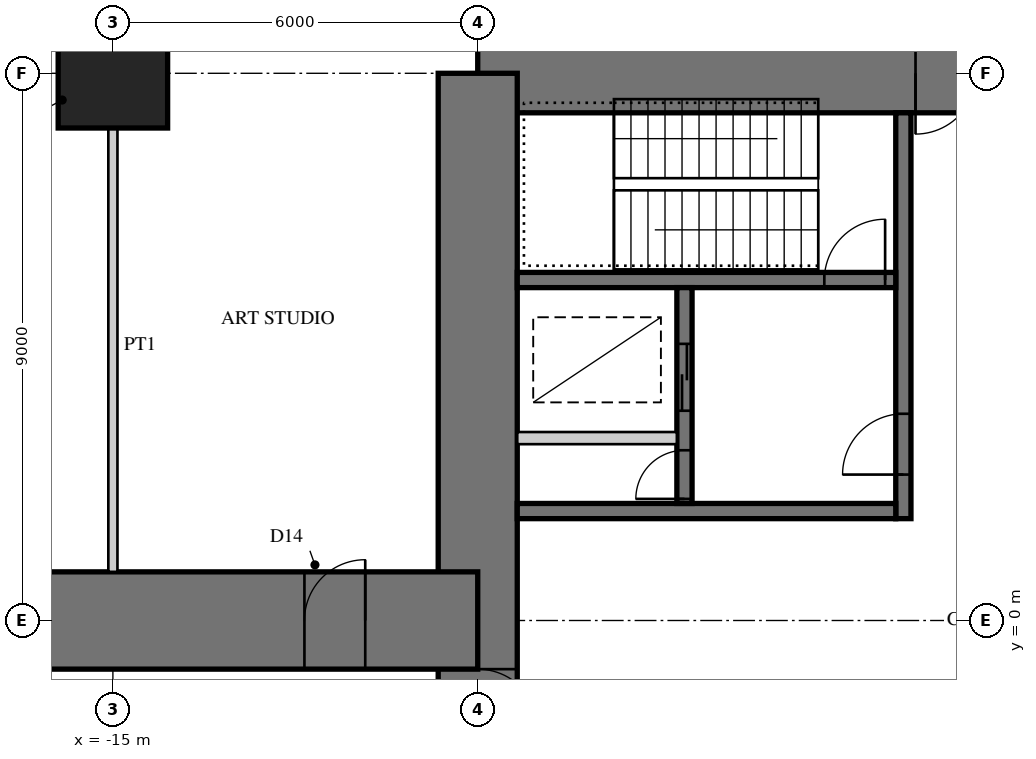
"""IFC4 building model, lengths in metres.
Left out: names, types, materials, properties, quantities, classifications, styles, units other than length and angle.
Written with IfcOpenShell. Run it as: python <this file> out.ifc"""

import sys

from ifc_helpers import new_model, si_unit, direction, frame, frame_2d, origin, origin_2d, place, context, subcontext, project, spatial, rectangle, extrude, element, fill, save


model = new_model("IFC4")
c1 = context("Model", 3, precision=1e-05, world=origin(), true_north=direction((0.0, 1.0)))
c2 = subcontext(c1, "Body", "Model", "MODEL_VIEW")
j1 = project(units=[si_unit("LENGTHUNIT", "METRE"), si_unit("PLANEANGLEUNIT", "RADIAN")], contexts=[c1])
p1 = place(None, origin())
s1 = spatial("IfcSite", under=j1, at=p1, CompositionType="ELEMENT")
p2 = place(p1, origin())
s2 = spatial("IfcBuilding", under=s1, at=p2, CompositionType="ELEMENT")
p3 = place(p2, frame((0.0, 0.0, 14.0)))
s3 = spatial("IfcBuildingStorey", under=s2, at=p3, CompositionType="ELEMENT", Elevation=14.0)
p4 = place(p3, frame((9.0, 9.0, 0.0), z_axis=(0.0, 0.0, 1.0), x_axis=(-1.0, 0.0, 0.0)))
e1 = element("IfcWall", 1, at=p4, inside=s3, PredefinedType="SHEAR", context=c2, shape_type="SweptSolid", body=[
    extrude(rectangle(XDim=18.0, YDim=1.3, at=frame_2d((9.0, 0.0))), origin(), (0.0, 0.0, 1.0), 4.5),
])
p5 = place(p4, frame((9.8, 0.0, 0.0)))
e2 = element("IfcOpeningElement", 2, at=p5, cuts=e1, PredefinedType="OPENING", context=c2, shape_type="SweptSolid", body=[
    extrude(rectangle(XDim=1.0, YDim=2.4, at=frame_2d((0.5, 1.2))), frame((0.0, 0.66, 0.0), z_axis=(0.0, -1.0, 0.0), x_axis=(1.0, 0.0, 0.0)), (0.0, 0.0, 1.0), 1.32),
])
p6 = place(p3, frame((-9.0, 9.0, 0.0), z_axis=(0.0, 0.0, 1.0), x_axis=(0.0, -1.0, 0.0)))
e3 = element("IfcWall", 3, at=p6, inside=s3, PredefinedType="SHEAR", context=c2, shape_type="SweptSolid", body=[
    extrude(rectangle(XDim=18.0, YDim=1.3, at=frame_2d((9.0, 0.0))), origin(), (0.0, 0.0, 1.0), 4.5),
])
p7 = place(p6, frame((9.8, 0.0, 0.0)))
e4 = element("IfcOpeningElement", 4, at=p7, cuts=e3, PredefinedType="OPENING", context=c2, shape_type="SweptSolid", body=[
    extrude(rectangle(XDim=1.0, YDim=2.4, at=frame_2d((0.5, 1.2))), frame((0.0, 0.66, 0.0), z_axis=(0.0, -1.0, 0.0), x_axis=(1.0, 0.0, 0.0)), (0.0, 0.0, 1.0), 1.32),
])
p8 = place(p3, frame((-2.0, 1.675, 0.0), z_axis=(0.0, 0.0, 1.0), x_axis=(0.0, 1.0, 0.0)))
e5 = element("IfcWall", 5, at=p8, inside=s3, PredefinedType="SHEAR", context=c2, shape_type="SweptSolid", body=[
    extrude(rectangle(XDim=6.675, YDim=0.25, at=frame_2d((3.337, 0.0))), origin(), (0.0, 0.0, 1.0), 4.5),
])
p9 = place(p8, frame((0.725, 0.0, 0.0)))
e6 = element("IfcOpeningElement", 6, at=p9, cuts=e5, PredefinedType="OPENING", context=c2, shape_type="SweptSolid", body=[
    extrude(rectangle(XDim=1.0, YDim=2.1, at=frame_2d((0.5, 1.05))), frame((0.0, 0.135, 0.0), z_axis=(0.0, -1.0, 0.0), x_axis=(1.0, 0.0, 0.0)), (0.0, 0.0, 1.0), 0.27),
])
p10 = place(p3, frame((-2.125, 1.8, 0.0), z_axis=(0.0, 0.0, 1.0), x_axis=(-1.0, 0.0, 0.0)))
e7 = element("IfcWall", 7, at=p10, inside=s3, PredefinedType="SHEAR", context=c2, shape_type="SweptSolid", body=[
    extrude(rectangle(XDim=6.225, YDim=0.25, at=frame_2d((3.113, 0.0))), origin(), (0.0, 0.0, 1.0), 4.5),
])
p11 = place(p3, frame((-2.125, 5.6, 0.0), z_axis=(0.0, 0.0, 1.0), x_axis=(-1.0, 0.0, 0.0)))
e8 = element("IfcWall", 8, at=p11, inside=s3, PredefinedType="SHEAR", context=c2, shape_type="SweptSolid", body=[
    extrude(rectangle(XDim=6.225, YDim=0.25, at=frame_2d((3.113, 0.0))), origin(), (0.0, 0.0, 1.0), 4.5),
])
p12 = place(p11, frame((0.175, 0.0, 0.0)))
e9 = element("IfcOpeningElement", 9, at=p12, cuts=e8, PredefinedType="OPENING", context=c2, shape_type="SweptSolid", body=[
    extrude(rectangle(XDim=1.0, YDim=2.1, at=frame_2d((0.5, 1.05))), frame((0.0, 0.135, 0.0), z_axis=(0.0, -1.0, 0.0), x_axis=(1.0, 0.0, 0.0)), (0.0, 0.0, 1.0), 0.27),
])
p13 = place(p3, frame((-5.6, 1.925, 0.0), z_axis=(0.0, 0.0, 1.0), x_axis=(0.0, 1.0, 0.0)))
e10 = element("IfcWall", 10, at=p13, inside=s3, PredefinedType="SHEAR", context=c2, shape_type="SweptSolid", body=[
    extrude(rectangle(XDim=3.55, YDim=0.25, at=frame_2d((1.775, 0.0))), origin(), (0.0, 0.0, 1.0), 4.5),
])
p14 = place(p13, frame((1.525, 0.0, 0.0)))
e11 = element("IfcOpeningElement", 11, at=p14, cuts=e10, PredefinedType="OPENING", context=c2, shape_type="SweptSolid", body=[
    extrude(rectangle(XDim=1.1, YDim=2.2, at=frame_2d((0.55, 1.1))), frame((0.0, 0.135, 0.0), z_axis=(0.0, -1.0, 0.0), x_axis=(1.0, 0.0, 0.0)), (0.0, 0.0, 1.0), 0.27),
])
p15 = place(p13, frame((0.075, 0.0, 0.0)))
e12 = element("IfcOpeningElement", 12, at=p15, cuts=e10, PredefinedType="OPENING", context=c2, shape_type="SweptSolid", body=[
    extrude(rectangle(XDim=0.8, YDim=2.1, at=frame_2d((0.4, 1.05))), frame((0.0, 0.135, 0.0), z_axis=(0.0, -1.0, 0.0), x_axis=(1.0, 0.0, 0.0)), (0.0, 0.0, 1.0), 0.27),
])
p16 = place(p3, frame((-5.725, 3.0, 0.0), z_axis=(0.0, 0.0, 1.0), x_axis=(-1.0, 0.0, 0.0)))
e13 = element("IfcWall", 13, at=p16, inside=s3, PredefinedType="PARTITIONING", context=c2, shape_type="SweptSolid", body=[
    extrude(rectangle(XDim=2.625, YDim=0.2, at=frame_2d((1.312, 0.0))), origin(), (0.0, 0.0, 1.0), 4.5),
])
p17 = place(p3, frame((-9.0, 0.0, 0.0), z_axis=(0.0, 0.0, 1.0), x_axis=(-1.0, 0.0, 0.0)))
e14 = element("IfcWall", 14, at=p17, inside=s3, PredefinedType="SHEAR", context=c2, shape_type="SweptSolid", body=[
    extrude(rectangle(XDim=18.0, YDim=1.6, at=frame_2d((9.0, 0.0))), origin(), (0.0, 0.0, 1.0), 4.5),
])
p18 = place(p17, frame((1.85, 0.0, 0.0)))
e15 = element("IfcOpeningElement", 15, at=p18, cuts=e14, PredefinedType="OPENING", context=c2, shape_type="SweptSolid", body=[
    extrude(rectangle(XDim=1.0, YDim=2.2, at=frame_2d((0.5, 1.1))), frame((0.0, 0.81, 0.0), z_axis=(0.0, -1.0, 0.0), x_axis=(1.0, 0.0, 0.0)), (0.0, 0.0, 1.0), 1.62),
])
p19 = place(p17, frame((7.2, 0.0, 0.0)))
e16 = element("IfcOpeningElement", 16, at=p19, cuts=e14, PredefinedType="OPENING", context=c2, shape_type="SweptSolid", body=[
    extrude(rectangle(XDim=1.0, YDim=2.2, at=frame_2d((0.5, 1.1))), frame((0.0, 0.81, 0.0), z_axis=(0.0, -1.0, 0.0), x_axis=(1.0, 0.0, 0.0)), (0.0, 0.0, 1.0), 1.62),
])
p20 = place(p17, frame((12.95, 0.0, 0.0)))
e17 = element("IfcOpeningElement", 17, at=p20, cuts=e14, PredefinedType="OPENING", context=c2, shape_type="SweptSolid", body=[
    extrude(rectangle(XDim=1.0, YDim=2.2, at=frame_2d((0.5, 1.1))), frame((0.0, 0.81, 0.0), z_axis=(0.0, -1.0, 0.0), x_axis=(1.0, 0.0, 0.0)), (0.0, 0.0, 1.0), 1.62),
])
p21 = place(p3, frame((-15.0, 9.0, 0.0), z_axis=(0.0, 0.0, 1.0), x_axis=(1.0, 0.0, 0.0)))
e18 = element("IfcColumn", 18, at=p21, inside=s3, PredefinedType="COLUMN", context=c2, shape_type="SweptSolid", body=[
    extrude(rectangle(XDim=1.8, YDim=1.8, at=origin_2d()), origin(), (0.0, 0.0, 1.0), 4.5),
])
p22 = place(p3, frame((-15.0, 8.25, 0.0), z_axis=(0.0, 0.0, 1.0), x_axis=(0.0, -1.0, 0.0)))
e19 = element("IfcWall", 19, at=p22, inside=s3, PredefinedType="PARTITIONING", context=c2, shape_type="SweptSolid", body=[
    extrude(rectangle(XDim=7.45, YDim=0.15, at=frame_2d((3.725, 0.0))), origin(), (0.0, 0.0, 1.0), 3.2),
])
p23 = place(p18, frame((1.0, 0.0, 0.0), z_axis=(0.0, 0.0, 1.0), x_axis=(-1.0, 0.0, 0.0)))
e20 = element("IfcDoor", 20, at=p23, inside=s3, OperationType="SINGLE_SWING_RIGHT", PredefinedType="DOOR", context=c2, shape_type="SweptSolid", body=[
    extrude(rectangle(XDim=1.0, YDim=2.2, at=frame_2d((0.5, 1.1))), frame((0.0, 0.025, 0.0), z_axis=(0.0, -1.0, 0.0), x_axis=(1.0, 0.0, 0.0)), (0.0, 0.0, 1.0), 0.05),
])
fill(e15, e20)
p24 = place(p5, origin())
e21 = element("IfcDoor", 21, at=p24, inside=s3, OperationType="SINGLE_SWING_RIGHT", PredefinedType="DOOR", context=c2, shape_type="SweptSolid", body=[
    extrude(rectangle(XDim=1.0, YDim=2.4, at=frame_2d((0.5, 1.2))), frame((0.0, 0.055, 0.0), z_axis=(0.0, -1.0, 0.0), x_axis=(1.0, 0.0, 0.0)), (0.0, 0.0, 1.0), 0.05),
])
fill(e2, e21)
p25 = place(p7, origin())
e22 = element("IfcDoor", 22, at=p25, inside=s3, OperationType="SINGLE_SWING_RIGHT", PredefinedType="DOOR", context=c2, shape_type="SweptSolid", body=[
    extrude(rectangle(XDim=1.0, YDim=2.4, at=frame_2d((0.5, 1.2))), frame((0.0, 0.055, 0.0), z_axis=(0.0, -1.0, 0.0), x_axis=(1.0, 0.0, 0.0)), (0.0, 0.0, 1.0), 0.05),
])
fill(e4, e22)
p26 = place(p9, origin())
e23 = element("IfcDoor", 23, at=p26, inside=s3, OperationType="SINGLE_SWING_LEFT", PredefinedType="DOOR", context=c2, shape_type="SweptSolid", body=[
    extrude(rectangle(XDim=1.0, YDim=2.1, at=frame_2d((0.5, 1.05))), frame((0.0, 0.025, 0.0), z_axis=(0.0, -1.0, 0.0), x_axis=(1.0, 0.0, 0.0)), (0.0, 0.0, 1.0), 0.05),
])
fill(e6, e23)
p27 = place(p12, frame((1.0, 0.0, 0.0), z_axis=(0.0, 0.0, 1.0), x_axis=(-1.0, 0.0, 0.0)))
e24 = element("IfcDoor", 24, at=p27, inside=s3, OperationType="SINGLE_SWING_RIGHT", PredefinedType="DOOR", context=c2, shape_type="SweptSolid", body=[
    extrude(rectangle(XDim=1.0, YDim=2.1, at=frame_2d((0.5, 1.05))), frame((0.0, 0.025, 0.0), z_axis=(0.0, -1.0, 0.0), x_axis=(1.0, 0.0, 0.0)), (0.0, 0.0, 1.0), 0.05),
])
fill(e9, e24)
p28 = place(p14, origin())
e25 = element("IfcDoor", 25, at=p28, inside=s3, OperationType="DOUBLE_DOOR_SLIDING", PredefinedType="DOOR", context=c2, shape_type="SweptSolid", body=[
    extrude(rectangle(XDim=1.1, YDim=2.2, at=frame_2d((0.55, 1.1))), frame((0.0, 0.025, 0.0), z_axis=(0.0, -1.0, 0.0), x_axis=(1.0, 0.0, 0.0)), (0.0, 0.0, 1.0), 0.05),
])
fill(e11, e25)
p29 = place(p15, origin())
e26 = element("IfcDoor", 26, at=p29, inside=s3, OperationType="SINGLE_SWING_LEFT", PredefinedType="DOOR", context=c2, shape_type="SweptSolid", body=[
    extrude(rectangle(XDim=0.8, YDim=2.1, at=frame_2d((0.4, 1.05))), frame((0.0, 0.025, 0.0), z_axis=(0.0, -1.0, 0.0), x_axis=(1.0, 0.0, 0.0)), (0.0, 0.0, 1.0), 0.05),
])
fill(e12, e26)
save(model, sys.argv[1])
